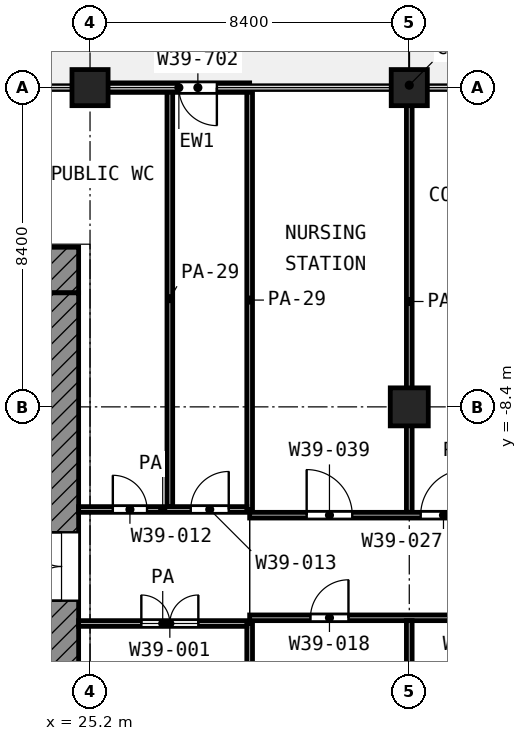
"""IFC4 building model, lengths in metres.
Left out: names, types, materials, properties, quantities, classifications, styles, units other than length and angle.
Written with IfcOpenShell. Run it as: python <this file> out.ifc"""

import sys

from ifc_helpers import new_model, si_unit, direction, frame, frame_2d, origin, origin_2d, place, context, subcontext, project, spatial, rectangle, extrude, element, fill, save


model = new_model("IFC4")
c1 = context("Model", 3, precision=1e-05, world=origin(), true_north=direction((0.0, 1.0)))
c2 = subcontext(c1, "Body", "Model", "MODEL_VIEW")
j1 = project(units=[si_unit("LENGTHUNIT", "METRE"), si_unit("PLANEANGLEUNIT", "RADIAN")], contexts=[c1])
p1 = place(None, origin())
s1 = spatial("IfcSite", under=j1, at=p1, CompositionType="ELEMENT")
p2 = place(p1, origin())
s2 = spatial("IfcBuilding", under=s1, at=p2, CompositionType="ELEMENT")
p3 = place(p2, frame((0.0, 0.0, 171.0)))
s3 = spatial("IfcBuildingStorey", under=s2, at=p3, CompositionType="ELEMENT", Elevation=171.0)
for number, where, z_axis, x_axis in (
    (1, (25.2, 0.0, 0.0), (0.0, 0.0, 1.0), (1.0, 0.0, 0.0)),
    (2, (33.6, 0.0, 0.0), (0.0, 0.0, 1.0), (1.0, 0.0, 0.0)),
):
    element("IfcColumn", number, at=place(p3, frame(where, z_axis=z_axis, x_axis=x_axis)), inside=s3, PredefinedType="COLUMN", context=c2, shape_type="SweptSolid", body=[
        extrude(rectangle(XDim=0.95, YDim=0.95, at=origin_2d()), origin(), (0.0, 0.0, 1.0), 4.2),
    ])
p4 = place(p3, frame((33.6, -8.4, 0.0), z_axis=(0.0, 0.0, 1.0), x_axis=(1.0, 0.0, 0.0)))
e3 = element("IfcColumn", 3, at=p4, inside=s3, PredefinedType="COLUMN", context=c2, shape_type="SweptSolid", body=[
    extrude(rectangle(XDim=1.0, YDim=1.0, at=origin_2d()), origin(), (0.0, 0.0, 1.0), 4.2),
])
p5 = place(p3, frame((29.4, 0.0, 0.0), z_axis=(0.0, 0.0, 1.0), x_axis=(-1.0, 0.0, 0.0)))
e4 = element("IfcWall", 4, at=p5, inside=s3, PredefinedType="SOLIDWALL", context=c2, shape_type="SweptSolid", body=[
    extrude(rectangle(XDim=3.725, YDim=0.25, at=frame_2d((1.862, 0.0))), origin(), (0.0, 0.0, 1.0), 2.58),
])
p6 = place(p5, frame((0.863, 0.0, 0.0)))
e5 = element("IfcOpeningElement", 5, at=p6, cuts=e4, PredefinedType="OPENING", context=c2, shape_type="SweptSolid", body=[
    extrude(rectangle(XDim=1.0, YDim=2.1, at=frame_2d((0.5, 1.05))), frame((0.0, 0.135, 0.0), z_axis=(0.0, -1.0, 0.0), x_axis=(1.0, 0.0, 0.0)), (0.0, 0.0, 1.0), 0.27),
])
p7 = place(p3, frame((4.2, -4.8, 0.0), z_axis=(0.0, 0.0, 1.0), x_axis=(1.0, 0.0, 0.0)))
e6 = element("IfcWall", 6, at=p7, inside=s3, PredefinedType="SHEAR", context=c2, shape_type="SweptSolid", body=[
    extrude(rectangle(XDim=20.7, YDim=1.2, at=frame_2d((10.35, 0.0))), origin(), (0.0, 0.0, 1.0), 3.6),
])
p8 = place(p7, frame((1.95, 0.0, 0.0)))
e7 = element("IfcOpeningElement", 7, at=p8, cuts=e6, PredefinedType="OPENING", context=c2, shape_type="SweptSolid", body=[
    extrude(rectangle(XDim=1.1, YDim=2.1, at=frame_2d((0.55, 1.05))), frame((0.0, 0.61, 0.0), z_axis=(0.0, -1.0, 0.0), x_axis=(1.0, 0.0, 0.0)), (0.0, 0.0, 1.0), 1.22),
])
p9 = place(p7, frame((17.95, 0.0, 0.0)))
e8 = element("IfcOpeningElement", 8, at=p9, cuts=e6, PredefinedType="OPENING", context=c2, shape_type="SweptSolid", body=[
    extrude(rectangle(XDim=1.1, YDim=2.1, at=frame_2d((0.55, 1.05))), frame((0.0, 0.61, 0.0), z_axis=(0.0, -1.0, 0.0), x_axis=(1.0, 0.0, 0.0)), (0.0, 0.0, 1.0), 1.22),
])
p10 = place(p3, frame((24.45, -24.0, 0.0), z_axis=(0.0, 0.0, 1.0), x_axis=(0.0, 1.0, 0.0)))
e9 = element("IfcWall", 9, at=p10, inside=s3, PredefinedType="SHEAR", context=c2, shape_type="SweptSolid", body=[
    extrude(rectangle(XDim=18.6, YDim=0.9, at=frame_2d((9.3, 0.0))), origin(), (0.0, 0.0, 1.0), 3.6),
])
p11 = place(p10, frame((10.5, 0.0, 0.0)))
e10 = element("IfcOpeningElement", 10, at=p11, cuts=e9, PredefinedType="OPENING", context=c2, shape_type="SweptSolid", body=[
    extrude(rectangle(XDim=1.8, YDim=2.1, at=frame_2d((0.9, 1.05))), frame((0.0, 0.46, 0.0), z_axis=(0.0, -1.0, 0.0), x_axis=(1.0, 0.0, 0.0)), (0.0, 0.0, 1.0), 0.92),
])
p12 = place(p3, frame((24.9, -14.1, 0.0), z_axis=(0.0, 0.0, 1.0), x_axis=(1.0, 0.0, 0.0)))
e11 = element("IfcWall", 11, at=p12, inside=s3, PredefinedType="PARTITIONING", context=c2, shape_type="SweptSolid", body=[
    extrude(rectangle(XDim=4.425, YDim=0.15, at=frame_2d((2.212, 0.0))), origin(), (0.0, 0.0, 1.0), 3.6),
])
p13 = place(p12, frame((1.65, 0.0, 0.0)))
e12 = element("IfcOpeningElement", 12, at=p13, cuts=e11, PredefinedType="OPENING", context=c2, shape_type="SweptSolid", body=[
    extrude(rectangle(XDim=1.5, YDim=2.1, at=frame_2d((0.75, 1.05))), frame((0.0, 0.085, 0.0), z_axis=(0.0, -1.0, 0.0), x_axis=(1.0, 0.0, 0.0)), (0.0, 0.0, 1.0), 0.17),
])
p14 = place(p3, frame((29.4, -13.95, 0.0), z_axis=(0.0, 0.0, 1.0), x_axis=(1.0, 0.0, 0.0)))
e13 = element("IfcWall", 13, at=p14, inside=s3, PredefinedType="PARTITIONING", context=c2, shape_type="SweptSolid", body=[
    extrude(rectangle(XDim=37.72, YDim=0.15, at=frame_2d((18.86, 0.0))), origin(), (0.0, 0.0, 1.0), 3.6),
])
p15 = place(p14, frame((1.6, 0.0, 0.0)))
e14 = element("IfcOpeningElement", 14, at=p15, cuts=e13, PredefinedType="OPENING", context=c2, shape_type="SweptSolid", body=[
    extrude(rectangle(XDim=1.0, YDim=2.1, at=frame_2d((0.5, 1.05))), frame((0.0, 0.085, 0.0), z_axis=(0.0, -1.0, 0.0), x_axis=(1.0, 0.0, 0.0)), (0.0, 0.0, 1.0), 0.17),
])
p16 = place(p14, frame((5.55, 0.0, 0.0)))
e15 = element("IfcOpeningElement", 15, at=p16, cuts=e13, PredefinedType="OPENING", context=c2, shape_type="SweptSolid", body=[
    extrude(rectangle(XDim=1.2, YDim=2.1, at=frame_2d((0.6, 1.05))), frame((0.0, 0.085, 0.0), z_axis=(0.0, -1.0, 0.0), x_axis=(1.0, 0.0, 0.0)), (0.0, 0.0, 1.0), 0.17),
])
p17 = place(p14, frame((11.2, 0.0, 0.0)))
e16 = element("IfcOpeningElement", 16, at=p17, cuts=e13, PredefinedType="OPENING", context=c2, shape_type="SweptSolid", body=[
    extrude(rectangle(XDim=1.2, YDim=2.1, at=frame_2d((0.6, 1.05))), frame((0.0, 0.085, 0.0), z_axis=(0.0, -1.0, 0.0), x_axis=(1.0, 0.0, 0.0)), (0.0, 0.0, 1.0), 0.17),
])
p18 = place(p14, frame((14.35, 0.0, 0.0)))
e17 = element("IfcOpeningElement", 17, at=p18, cuts=e13, PredefinedType="OPENING", context=c2, shape_type="SweptSolid", body=[
    extrude(rectangle(XDim=1.0, YDim=2.1, at=frame_2d((0.5, 1.05))), frame((0.0, 0.085, 0.0), z_axis=(0.0, -1.0, 0.0), x_axis=(1.0, 0.0, 0.0)), (0.0, 0.0, 1.0), 0.17),
])
p19 = place(p14, frame((19.6, 0.0, 0.0)))
e18 = element("IfcOpeningElement", 18, at=p19, cuts=e13, PredefinedType="OPENING", context=c2, shape_type="SweptSolid", body=[
    extrude(rectangle(XDim=1.2, YDim=2.1, at=frame_2d((0.6, 1.05))), frame((0.0, 0.085, 0.0), z_axis=(0.0, -1.0, 0.0), x_axis=(1.0, 0.0, 0.0)), (0.0, 0.0, 1.0), 0.17),
])
p20 = place(p14, frame((21.2, 0.0, 0.0)))
e19 = element("IfcOpeningElement", 19, at=p20, cuts=e13, PredefinedType="OPENING", context=c2, shape_type="SweptSolid", body=[
    extrude(rectangle(XDim=1.1, YDim=2.1, at=frame_2d((0.55, 1.05))), frame((0.0, 0.085, 0.0), z_axis=(0.0, -1.0, 0.0), x_axis=(1.0, 0.0, 0.0)), (0.0, 0.0, 1.0), 0.17),
])
p21 = place(p14, frame((27.9, 0.0, 0.0)))
e20 = element("IfcOpeningElement", 20, at=p21, cuts=e13, PredefinedType="OPENING", context=c2, shape_type="SweptSolid", body=[
    extrude(rectangle(XDim=1.2, YDim=2.1, at=frame_2d((0.6, 1.05))), frame((0.0, 0.085, 0.0), z_axis=(0.0, -1.0, 0.0), x_axis=(1.0, 0.0, 0.0)), (0.0, 0.0, 1.0), 0.17),
])
p22 = place(p14, frame((31.0, 0.0, 0.0)))
e21 = element("IfcOpeningElement", 21, at=p22, cuts=e13, PredefinedType="OPENING", context=c2, shape_type="SweptSolid", body=[
    extrude(rectangle(XDim=1.0, YDim=2.1, at=frame_2d((0.5, 1.05))), frame((0.0, 0.085, 0.0), z_axis=(0.0, -1.0, 0.0), x_axis=(1.0, 0.0, 0.0)), (0.0, 0.0, 1.0), 0.17),
])
p23 = place(p14, frame((35.2, 0.0, 0.0)))
e22 = element("IfcOpeningElement", 22, at=p23, cuts=e13, PredefinedType="OPENING", context=c2, shape_type="SweptSolid", body=[
    extrude(rectangle(XDim=1.0, YDim=2.1, at=frame_2d((0.5, 1.05))), frame((0.0, 0.085, 0.0), z_axis=(0.0, -1.0, 0.0), x_axis=(1.0, 0.0, 0.0)), (0.0, 0.0, 1.0), 0.17),
])
p24 = place(p3, frame((29.4, -11.25, 0.0), z_axis=(0.0, 0.0, 1.0), x_axis=(1.0, 0.0, 0.0)))
e23 = element("IfcWall", 23, at=p24, inside=s3, PredefinedType="PARTITIONING", context=c2, shape_type="SweptSolid", body=[
    extrude(rectangle(XDim=10.782, YDim=0.15, at=frame_2d((5.391, 0.0))), origin(), (0.0, 0.0, 1.0), 3.6),
])
p25 = place(p24, frame((4.5, 0.0, 0.0)))
e24 = element("IfcOpeningElement", 24, at=p25, cuts=e23, PredefinedType="OPENING", context=c2, shape_type="SweptSolid", body=[
    extrude(rectangle(XDim=1.2, YDim=2.1, at=frame_2d((0.6, 1.05))), frame((0.0, 0.085, 0.0), z_axis=(0.0, -1.0, 0.0), x_axis=(1.0, 0.0, 0.0)), (0.0, 0.0, 1.0), 0.17),
])
p26 = place(p24, frame((1.5, 0.0, 0.0)))
e25 = element("IfcOpeningElement", 25, at=p26, cuts=e23, PredefinedType="OPENING", context=c2, shape_type="SweptSolid", body=[
    extrude(rectangle(XDim=1.2, YDim=2.1, at=frame_2d((0.6, 1.05))), frame((0.0, 0.085, 0.0), z_axis=(0.0, -1.0, 0.0), x_axis=(1.0, 0.0, 0.0)), (0.0, 0.0, 1.0), 0.17),
])
p27 = place(p3, frame((24.9, -11.1, 0.0), z_axis=(0.0, 0.0, 1.0), x_axis=(1.0, 0.0, 0.0)))
e26 = element("IfcWall", 26, at=p27, inside=s3, PredefinedType="PARTITIONING", context=c2, shape_type="SweptSolid", body=[
    extrude(rectangle(XDim=4.425, YDim=0.15, at=frame_2d((2.212, 0.0))), origin(), (0.0, 0.0, 1.0), 3.6),
])
p28 = place(p27, frame((0.9, 0.0, 0.0)))
e27 = element("IfcOpeningElement", 27, at=p28, cuts=e26, PredefinedType="OPENING", context=c2, shape_type="SweptSolid", body=[
    extrude(rectangle(XDim=0.9, YDim=2.1, at=frame_2d((0.45, 1.05))), frame((0.0, 0.085, 0.0), z_axis=(0.0, -1.0, 0.0), x_axis=(1.0, 0.0, 0.0)), (0.0, 0.0, 1.0), 0.17),
])
p29 = place(p27, frame((2.95, 0.0, 0.0)))
e28 = element("IfcOpeningElement", 28, at=p29, cuts=e26, PredefinedType="OPENING", context=c2, shape_type="SweptSolid", body=[
    extrude(rectangle(XDim=1.0, YDim=2.1, at=frame_2d((0.5, 1.05))), frame((0.0, 0.085, 0.0), z_axis=(0.0, -1.0, 0.0), x_axis=(1.0, 0.0, 0.0)), (0.0, 0.0, 1.0), 0.17),
])
p30 = place(p3, frame((27.3, -11.025, 0.0), z_axis=(0.0, 0.0, 1.0), x_axis=(0.0, 1.0, 0.0)))
e29 = element("IfcWall", 29, at=p30, inside=s3, PredefinedType="PARTITIONING", context=c2, shape_type="SweptSolid", body=[
    extrude(rectangle(XDim=10.945, YDim=0.15, at=frame_2d((5.472, 0.0))), origin(), (0.0, 0.0, 1.0), 2.7),
])
p31 = place(p3, frame((29.4, -31.198, 0.0), z_axis=(0.0, 0.0, 1.0), x_axis=(0.0, 1.0, 0.0)))
e30 = element("IfcWall", 30, at=p31, inside=s3, PredefinedType="PARTITIONING", context=c2, shape_type="SweptSolid", body=[
    extrude(rectangle(XDim=17.098, YDim=0.15, at=frame_2d((8.549, 0.0))), origin(), (0.0, 0.0, 1.0), 3.6),
])
p32 = place(p3, frame((29.4, -11.1, 0.0), z_axis=(0.0, 0.0, 1.0), x_axis=(0.0, 1.0, 0.0)))
e31 = element("IfcWall", 31, at=p32, inside=s3, PredefinedType="PARTITIONING", context=c2, shape_type="SweptSolid", body=[
    extrude(rectangle(XDim=11.02, YDim=0.15, at=frame_2d((5.51, 0.0))), origin(), (0.0, 0.0, 1.0), 2.7),
])
p33 = place(p3, frame((33.6, -31.12, 0.0), z_axis=(0.0, 0.0, 1.0), x_axis=(0.0, 1.0, 0.0)))
e32 = element("IfcWall", 32, at=p33, inside=s3, PredefinedType="PARTITIONING", context=c2, shape_type="SweptSolid", body=[
    extrude(rectangle(XDim=17.095, YDim=0.15, at=frame_2d((8.548, 0.0))), origin(), (0.0, 0.0, 1.0), 3.6),
])
p34 = place(p3, frame((33.6, -11.175, 0.0), z_axis=(0.0, 0.0, 1.0), x_axis=(0.0, 1.0, 0.0)))
e33 = element("IfcWall", 33, at=p34, inside=s3, PredefinedType="PARTITIONING", context=c2, shape_type="SweptSolid", body=[
    extrude(rectangle(XDim=11.095, YDim=0.15, at=frame_2d((5.547, 0.0))), origin(), (0.0, 0.0, 1.0), 3.6),
])
p35 = place(p6, origin())
e34 = element("IfcDoor", 34, at=p35, inside=s3, OperationType="SINGLE_SWING_LEFT", PredefinedType="DOOR", context=c2, shape_type="SweptSolid", body=[
    extrude(rectangle(XDim=1.0, YDim=2.1, at=frame_2d((0.5, 1.05))), frame((0.0, 0.025, 0.0), z_axis=(0.0, -1.0, 0.0), x_axis=(1.0, 0.0, 0.0)), (0.0, 0.0, 1.0), 0.05),
])
fill(e5, e34)
p36 = place(p11, origin())
e35 = element("IfcDoor", 35, at=p36, inside=s3, OperationType="DOUBLE_DOOR_SINGLE_SWING", PredefinedType="DOOR", context=c2, shape_type="SweptSolid", body=[
    extrude(rectangle(XDim=1.8, YDim=2.1, at=frame_2d((0.9, 1.05))), frame((0.0, 0.025, 0.0), z_axis=(0.0, -1.0, 0.0), x_axis=(1.0, 0.0, 0.0)), (0.0, 0.0, 1.0), 0.05),
])
fill(e10, e35)
p37 = place(p13, origin())
e36 = element("IfcDoor", 36, at=p37, inside=s3, OperationType="DOUBLE_DOOR_SINGLE_SWING", PredefinedType="DOOR", context=c2, shape_type="SweptSolid", body=[
    extrude(rectangle(XDim=1.5, YDim=2.1, at=frame_2d((0.75, 1.05))), frame((0.0, 0.025, 0.0), z_axis=(0.0, -1.0, 0.0), x_axis=(1.0, 0.0, 0.0)), (0.0, 0.0, 1.0), 0.05),
])
fill(e12, e36)
p38 = place(p25, origin())
e37 = element("IfcDoor", 37, at=p38, inside=s3, OperationType="SINGLE_SWING_RIGHT", PredefinedType="DOOR", context=c2, shape_type="SweptSolid", body=[
    extrude(rectangle(XDim=1.2, YDim=2.1, at=frame_2d((0.6, 1.05))), frame((0.0, 0.025, 0.0), z_axis=(0.0, -1.0, 0.0), x_axis=(1.0, 0.0, 0.0)), (0.0, 0.0, 1.0), 0.05),
])
fill(e24, e37)
p39 = place(p15, origin())
e38 = element("IfcDoor", 38, at=p39, inside=s3, OperationType="SINGLE_SWING_RIGHT", PredefinedType="DOOR", context=c2, shape_type="SweptSolid", body=[
    extrude(rectangle(XDim=1.0, YDim=2.1, at=frame_2d((0.5, 1.05))), frame((0.0, 0.025, 0.0), z_axis=(0.0, -1.0, 0.0), x_axis=(1.0, 0.0, 0.0)), (0.0, 0.0, 1.0), 0.05),
])
fill(e14, e38)
p40 = place(p28, origin())
e39 = element("IfcDoor", 39, at=p40, inside=s3, OperationType="SINGLE_SWING_LEFT", PredefinedType="DOOR", context=c2, shape_type="SweptSolid", body=[
    extrude(rectangle(XDim=0.9, YDim=2.1, at=frame_2d((0.45, 1.05))), frame((0.0, 0.025, 0.0), z_axis=(0.0, -1.0, 0.0), x_axis=(1.0, 0.0, 0.0)), (0.0, 0.0, 1.0), 0.05),
])
fill(e27, e39)
p41 = place(p29, origin())
e40 = element("IfcDoor", 40, at=p41, inside=s3, OperationType="SINGLE_SWING_RIGHT", PredefinedType="DOOR", context=c2, shape_type="SweptSolid", body=[
    extrude(rectangle(XDim=1.0, YDim=2.1, at=frame_2d((0.5, 1.05))), frame((0.0, 0.025, 0.0), z_axis=(0.0, -1.0, 0.0), x_axis=(1.0, 0.0, 0.0)), (0.0, 0.0, 1.0), 0.05),
])
fill(e28, e40)
p42 = place(p26, origin())
e41 = element("IfcDoor", 41, at=p42, inside=s3, OperationType="SINGLE_SWING_LEFT", PredefinedType="DOOR", context=c2, shape_type="SweptSolid", body=[
    extrude(rectangle(XDim=1.2, YDim=2.1, at=frame_2d((0.6, 1.05))), frame((0.0, 0.025, 0.0), z_axis=(0.0, -1.0, 0.0), x_axis=(1.0, 0.0, 0.0)), (0.0, 0.0, 1.0), 0.05),
])
fill(e25, e41)
save(model, sys.argv[1])
